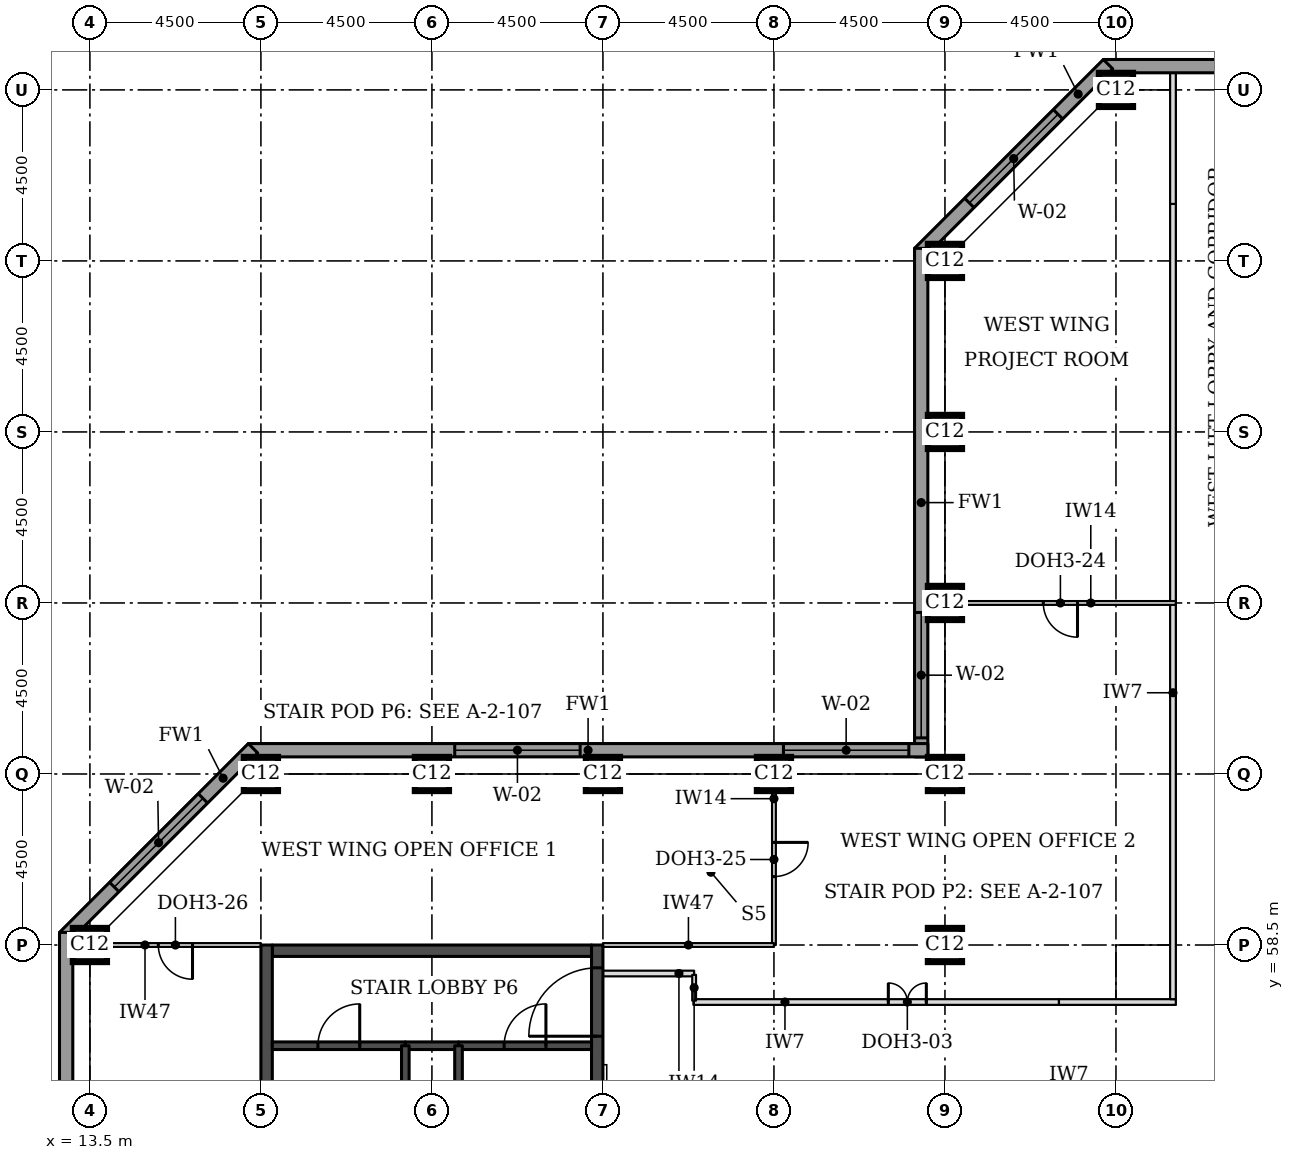
"""IFC4 building model, lengths in metres.
Left out: names, types, materials, properties, quantities, classifications, styles, units other than length and angle.
Written with IfcOpenShell. Run it as: python <this file> out.ifc"""

import sys

from ifc_helpers import new_model, si_unit, direction, frame, frame_2d, origin, origin_2d, place, context, subcontext, project, spatial, rectangle, extrude, element, fill, save


model = new_model("IFC4")
c1 = context("Model", 3, precision=1e-05, world=origin(), true_north=direction((0.0, 1.0)))
c2 = subcontext(c1, "Body", "Model", "MODEL_VIEW")
j1 = project(units=[si_unit("LENGTHUNIT", "METRE"), si_unit("PLANEANGLEUNIT", "RADIAN")], contexts=[c1])
p1 = place(None, origin())
s1 = spatial("IfcSite", under=j1, at=p1, CompositionType="ELEMENT")
p2 = place(p1, origin())
s2 = spatial("IfcBuilding", under=s1, at=p2, CompositionType="ELEMENT")
p3 = place(p2, frame((0.0, 0.0, 166.2)))
s3 = spatial("IfcBuildingStorey", under=s2, at=p3, CompositionType="ELEMENT", Elevation=166.2)
for number, where, z_axis, x_axis in (
    (1, (13.5, 58.5, 0.0), (0.0, 0.0, 1.0), (1.0, 0.0, 0.0)),
    (2, (36.0, 58.5, 0.0), (0.0, 0.0, 1.0), (1.0, 0.0, 0.0)),
    (3, (18.0, 63.0, 0.0), (0.0, 0.0, 1.0), (1.0, 0.0, 0.0)),
    (4, (22.5, 63.0, 0.0), (0.0, 0.0, 1.0), (1.0, 0.0, 0.0)),
    (5, (27.0, 63.0, 0.0), (0.0, 0.0, 1.0), (1.0, 0.0, 0.0)),
    (6, (31.5, 63.0, 0.0), (0.0, 0.0, 1.0), (1.0, 0.0, 0.0)),
    (7, (36.0, 63.0, 0.0), (0.0, 0.0, 1.0), (1.0, 0.0, 0.0)),
    (8, (36.0, 67.5, 0.0), (0.0, 0.0, 1.0), (1.0, 0.0, 0.0)),
    (9, (36.0, 72.0, 0.0), (0.0, 0.0, 1.0), (1.0, 0.0, 0.0)),
    (10, (36.0, 76.5, 0.0), (0.0, 0.0, 1.0), (1.0, 0.0, 0.0)),
    (11, (40.5, 81.0, 0.0), (0.0, 0.0, 1.0), (1.0, 0.0, 0.0)),
):
    element("IfcColumn", number, at=place(p3, frame(where, z_axis=z_axis, x_axis=x_axis)), inside=s3, PredefinedType="COLUMN", context=c2, shape_type="SweptSolid", body=[
        extrude(rectangle(XDim=0.9, YDim=0.9, at=origin_2d()), origin(), (0.0, 0.0, 1.0), 3.7),
    ])
p4 = place(p3, frame((18.3, 58.35, 0.0), z_axis=(0.0, 0.0, 1.0), x_axis=(1.0, 0.0, 0.0)))
e12 = element("IfcWall", 12, at=p4, inside=s3, PredefinedType="SHEAR", context=c2, shape_type="SweptSolid", body=[
    extrude(rectangle(XDim=8.4, YDim=0.3, at=frame_2d((4.2, 0.0))), origin(), (0.0, 0.0, 1.0), 3.7),
])
p5 = place(p3, frame((18.15, 49.5, 0.0), z_axis=(0.0, 0.0, 1.0), x_axis=(0.0, 1.0, 0.0)))
e13 = element("IfcWall", 13, at=p5, inside=s3, PredefinedType="SHEAR", context=c2, shape_type="SweptSolid", body=[
    extrude(rectangle(XDim=9.0, YDim=0.3, at=frame_2d((4.5, 0.0))), origin(), (0.0, 0.0, 1.0), 3.7),
])
p6 = place(p3, frame((26.85, 49.5, 0.0), z_axis=(0.0, 0.0, 1.0), x_axis=(0.0, 1.0, 0.0)))
e14 = element("IfcWall", 14, at=p6, inside=s3, PredefinedType="SHEAR", context=c2, shape_type="SweptSolid", body=[
    extrude(rectangle(XDim=9.0, YDim=0.3, at=frame_2d((4.5, 0.0))), origin(), (0.0, 0.0, 1.0), 3.7),
])
p7 = place(p6, frame((6.6, 0.0, 0.0)))
e15 = element("IfcOpeningElement", 15, at=p7, cuts=e14, PredefinedType="OPENING", context=c2, shape_type="SweptSolid", body=[
    extrude(rectangle(XDim=1.8, YDim=2.1, at=frame_2d((0.9, 1.05))), frame((0.0, 0.16, 0.0), z_axis=(0.0, -1.0, 0.0), x_axis=(1.0, 0.0, 0.0)), (0.0, 0.0, 1.0), 0.32),
])
p8 = place(p3, frame((72.331, 81.625, 0.0), z_axis=(0.0, 0.0, 1.0), x_axis=(-1.0, 0.0, 0.0)))
e16 = element("IfcWall", 16, at=p8, inside=s3, PredefinedType="STANDARD", context=c2, shape_type="SweptSolid", body=[
    extrude(rectangle(XDim=32.163, YDim=0.35, at=frame_2d((16.081, 0.0))), origin(), (0.0, 0.0, 1.0), 3.525),
])
p9 = place(p8, frame((5.431, 0.0, 0.9)))
e17 = element("IfcOpeningElement", 17, at=p9, cuts=e16, PredefinedType="OPENING", context=c2, shape_type="SweptSolid", body=[
    extrude(rectangle(XDim=3.3, YDim=1.9, at=frame_2d((1.65, 0.95))), frame((0.0, 0.185, 0.0), z_axis=(0.0, -1.0, 0.0), x_axis=(1.0, 0.0, 0.0)), (0.0, 0.0, 1.0), 0.37),
])
p10 = place(p8, frame((9.931, 0.0, 0.9)))
e18 = element("IfcOpeningElement", 18, at=p10, cuts=e16, PredefinedType="OPENING", context=c2, shape_type="SweptSolid", body=[
    extrude(rectangle(XDim=3.3, YDim=1.9, at=frame_2d((1.65, 0.95))), frame((0.0, 0.185, 0.0), z_axis=(0.0, -1.0, 0.0), x_axis=(1.0, 0.0, 0.0)), (0.0, 0.0, 1.0), 0.37),
])
p11 = place(p8, frame((14.431, 0.0, 0.9)))
e19 = element("IfcOpeningElement", 19, at=p11, cuts=e16, PredefinedType="OPENING", context=c2, shape_type="SweptSolid", body=[
    extrude(rectangle(XDim=3.3, YDim=1.9, at=frame_2d((1.65, 0.95))), frame((0.0, 0.185, 0.0), z_axis=(0.0, -1.0, 0.0), x_axis=(1.0, 0.0, 0.0)), (0.0, 0.0, 1.0), 0.37),
])
p12 = place(p8, frame((18.931, 0.0, 0.9)))
e20 = element("IfcOpeningElement", 20, at=p12, cuts=e16, PredefinedType="OPENING", context=c2, shape_type="SweptSolid", body=[
    extrude(rectangle(XDim=3.3, YDim=1.9, at=frame_2d((1.65, 0.95))), frame((0.0, 0.185, 0.0), z_axis=(0.0, -1.0, 0.0), x_axis=(1.0, 0.0, 0.0)), (0.0, 0.0, 1.0), 0.37),
])
p13 = place(p8, frame((23.431, 0.0, 0.9)))
e21 = element("IfcOpeningElement", 21, at=p13, cuts=e16, PredefinedType="OPENING", context=c2, shape_type="SweptSolid", body=[
    extrude(rectangle(XDim=3.3, YDim=1.9, at=frame_2d((1.65, 0.95))), frame((0.0, 0.185, 0.0), z_axis=(0.0, -1.0, 0.0), x_axis=(1.0, 0.0, 0.0)), (0.0, 0.0, 1.0), 0.37),
])
p14 = place(p3, frame((40.292, 81.676, 0.0), z_axis=(0.0, 0.0, 1.0), x_axis=(-0.707106781187, -0.707106781187, 0.0)))
e22 = element("IfcWall", 22, at=p14, inside=s3, PredefinedType="STANDARD", context=c2, shape_type="SweptSolid", body=[
    extrude(rectangle(XDim=7.027, YDim=0.35, at=frame_2d((3.513, 0.0))), origin(), (0.0, 0.0, 1.0), 3.525),
])
p15 = place(p14, frame((1.863, 0.0, 0.9)))
e23 = element("IfcOpeningElement", 23, at=p15, cuts=e22, PredefinedType="OPENING", context=c2, shape_type="SweptSolid", body=[
    extrude(rectangle(XDim=3.3, YDim=1.9, at=frame_2d((1.65, 0.95))), frame((0.0, 0.185, 0.0), z_axis=(0.0, -1.0, 0.0), x_axis=(1.0, 0.0, 0.0)), (0.0, 0.0, 1.0), 0.37),
])
p16 = place(p3, frame((35.375, 76.831, 0.0), z_axis=(0.0, 0.0, 1.0), x_axis=(0.0, -1.0, 0.0)))
e24 = element("IfcWall", 24, at=p16, inside=s3, PredefinedType="STANDARD", context=c2, shape_type="SweptSolid", body=[
    extrude(rectangle(XDim=13.381, YDim=0.35, at=frame_2d((6.691, 0.0))), origin(), (0.0, 0.0, 1.0), 3.525),
])
p17 = place(p16, frame((9.581, 0.0, 0.9)))
e25 = element("IfcOpeningElement", 25, at=p17, cuts=e24, PredefinedType="OPENING", context=c2, shape_type="SweptSolid", body=[
    extrude(rectangle(XDim=3.3, YDim=1.9, at=frame_2d((1.65, 0.95))), frame((0.0, 0.185, 0.0), z_axis=(0.0, -1.0, 0.0), x_axis=(1.0, 0.0, 0.0)), (0.0, 0.0, 1.0), 0.37),
])
p18 = place(p3, frame((35.55, 63.625, 0.0), z_axis=(0.0, 0.0, 1.0), x_axis=(-1.0, 0.0, 0.0)))
e26 = element("IfcWall", 26, at=p18, inside=s3, PredefinedType="STANDARD", context=c2, shape_type="SweptSolid", body=[
    extrude(rectangle(XDim=17.881, YDim=0.35, at=frame_2d((8.941, 0.0))), origin(), (0.0, 0.0, 1.0), 3.525),
])
p19 = place(p18, frame((0.5, 0.0, 0.9)))
e27 = element("IfcOpeningElement", 27, at=p19, cuts=e26, PredefinedType="OPENING", context=c2, shape_type="SweptSolid", body=[
    extrude(rectangle(XDim=3.3, YDim=1.9, at=frame_2d((1.65, 0.95))), frame((0.0, 0.185, 0.0), z_axis=(0.0, -1.0, 0.0), x_axis=(1.0, 0.0, 0.0)), (0.0, 0.0, 1.0), 0.37),
])
p20 = place(p18, frame((9.15, 0.0, 0.9)))
e28 = element("IfcOpeningElement", 28, at=p20, cuts=e26, PredefinedType="OPENING", context=c2, shape_type="SweptSolid", body=[
    extrude(rectangle(XDim=3.3, YDim=1.9, at=frame_2d((1.65, 0.95))), frame((0.0, 0.185, 0.0), z_axis=(0.0, -1.0, 0.0), x_axis=(1.0, 0.0, 0.0)), (0.0, 0.0, 1.0), 0.37),
])
p21 = place(p3, frame((17.792, 63.676, 0.0), z_axis=(0.0, 0.0, 1.0), x_axis=(-0.707106781187, -0.707106781187, 0.0)))
e29 = element("IfcWall", 29, at=p21, inside=s3, PredefinedType="STANDARD", context=c2, shape_type="SweptSolid", body=[
    extrude(rectangle(XDim=7.027, YDim=0.35, at=frame_2d((3.513, 0.0))), origin(), (0.0, 0.0, 1.0), 3.525),
])
p22 = place(p21, frame((1.863, 0.0, 0.9)))
e30 = element("IfcOpeningElement", 30, at=p22, cuts=e29, PredefinedType="OPENING", context=c2, shape_type="SweptSolid", body=[
    extrude(rectangle(XDim=3.3, YDim=1.9, at=frame_2d((1.65, 0.95))), frame((0.0, 0.185, 0.0), z_axis=(0.0, -1.0, 0.0), x_axis=(1.0, 0.0, 0.0)), (0.0, 0.0, 1.0), 0.37),
])
p23 = place(p3, frame((12.875, 58.831, 0.0), z_axis=(0.0, 0.0, 1.0), x_axis=(0.0, -1.0, 0.0)))
e31 = element("IfcWall", 31, at=p23, inside=s3, PredefinedType="STANDARD", context=c2, shape_type="SweptSolid", body=[
    extrude(rectangle(XDim=14.163, YDim=0.35, at=frame_2d((7.081, 0.0))), origin(), (0.0, 0.0, 1.0), 3.525),
])
p24 = place(p23, frame((5.431, 0.0, 0.9)))
e32 = element("IfcOpeningElement", 32, at=p24, cuts=e31, PredefinedType="OPENING", context=c2, shape_type="SweptSolid", body=[
    extrude(rectangle(XDim=3.3, YDim=1.9, at=frame_2d((1.65, 0.95))), frame((0.0, 0.185, 0.0), z_axis=(0.0, -1.0, 0.0), x_axis=(1.0, 0.0, 0.0)), (0.0, 0.0, 1.0), 0.37),
])
p25 = place(p3, frame((29.38, 57.0, 0.0), z_axis=(0.0, 0.0, 1.0), x_axis=(1.0, 0.0, 0.0)))
e33 = element("IfcWall", 33, at=p25, inside=s3, PredefinedType="PARTITIONING", context=c2, shape_type="SweptSolid", body=[
    extrude(rectangle(XDim=9.62, YDim=0.15, at=frame_2d((4.81, 0.0))), origin(), (0.0, 0.0, 1.0), 3.55),
])
p26 = place(p25, frame((5.13, 0.0, 0.0)))
e34 = element("IfcOpeningElement", 34, at=p26, cuts=e33, PredefinedType="OPENING", context=c2, shape_type="SweptSolid", body=[
    extrude(rectangle(XDim=1.0, YDim=2.1, at=frame_2d((0.5, 1.05))), frame((0.0, 0.085, 0.0), z_axis=(0.0, -1.0, 0.0), x_axis=(1.0, 0.0, 0.0)), (0.0, 0.0, 1.0), 0.17),
])
p27 = place(p3, frame((39.0, 57.0, 0.0), z_axis=(0.0, 0.0, 1.0), x_axis=(1.0, 0.0, 0.0)))
e35 = element("IfcWall", 35, at=p27, inside=s3, PredefinedType="PARTITIONING", context=c2, shape_type="SweptSolid", body=[
    extrude(rectangle(XDim=3.075, YDim=0.15, at=frame_2d((1.538, 0.0))), origin(), (0.0, 0.0, 1.0), 3.55),
])
p28 = place(p3, frame((42.0, 57.075, 0.0), z_axis=(0.0, 0.0, 1.0), x_axis=(0.0, 1.0, 0.0)))
e36 = element("IfcWall", 36, at=p28, inside=s3, PredefinedType="PARTITIONING", context=c2, shape_type="SweptSolid", body=[
    extrude(rectangle(XDim=20.925, YDim=0.15, at=frame_2d((10.462, 0.0))), origin(), (0.0, 0.0, 1.0), 3.55),
])
p29 = place(p3, frame((42.0, 78.0, 0.0), z_axis=(0.0, 0.0, 1.0), x_axis=(0.0, 1.0, 0.0)))
e37 = element("IfcWall", 37, at=p29, inside=s3, PredefinedType="PARTITIONING", context=c2, shape_type="SweptSolid", body=[
    extrude(rectangle(XDim=3.45, YDim=0.15, at=frame_2d((1.725, 0.0))), origin(), (0.0, 0.0, 1.0), 3.55),
])
p30 = place(p3, frame((36.0, 67.5, 0.0), z_axis=(0.0, 0.0, 1.0), x_axis=(1.0, 0.0, 0.0)))
e38 = element("IfcWall", 38, at=p30, inside=s3, PredefinedType="PARTITIONING", context=c2, shape_type="SweptSolid", body=[
    extrude(rectangle(XDim=6.075, YDim=0.1, at=frame_2d((3.038, 0.0))), origin(), (0.0, 0.0, 1.0), 3.55),
])
p31 = place(p30, frame((2.588, 0.0, 0.0)))
e39 = element("IfcOpeningElement", 39, at=p31, cuts=e38, PredefinedType="OPENING", context=c2, shape_type="SweptSolid", body=[
    extrude(rectangle(XDim=0.9, YDim=2.1, at=frame_2d((0.45, 1.05))), frame((0.0, 0.06, 0.0), z_axis=(0.0, -1.0, 0.0), x_axis=(1.0, 0.0, 0.0)), (0.0, 0.0, 1.0), 0.12),
])
p32 = place(p3, frame((31.5, 63.0, 0.0), z_axis=(0.0, 0.0, 1.0), x_axis=(0.0, -1.0, 0.0)))
e40 = element("IfcWall", 40, at=p32, inside=s3, PredefinedType="PARTITIONING", context=c2, shape_type="SweptSolid", body=[
    extrude(rectangle(XDim=4.5, YDim=0.1, at=frame_2d((2.25, 0.0))), origin(), (0.0, 0.0, 1.0), 3.55),
])
p33 = place(p32, frame((1.8, 0.0, 0.0)))
e41 = element("IfcOpeningElement", 41, at=p33, cuts=e40, PredefinedType="OPENING", context=c2, shape_type="SweptSolid", body=[
    extrude(rectangle(XDim=0.9, YDim=2.1, at=frame_2d((0.45, 1.05))), frame((0.0, 0.06, 0.0), z_axis=(0.0, -1.0, 0.0), x_axis=(1.0, 0.0, 0.0)), (0.0, 0.0, 1.0), 0.12),
])
p34 = place(p3, frame((31.5, 58.5, 0.0), z_axis=(0.0, 0.0, 1.0), x_axis=(-1.0, 0.0, 0.0)))
e42 = element("IfcWall", 42, at=p34, inside=s3, PredefinedType="PARTITIONING", context=c2, shape_type="SweptSolid", body=[
    extrude(rectangle(XDim=4.5, YDim=0.1, at=frame_2d((2.25, 0.0))), origin(), (0.0, 0.0, 1.0), 2.55),
])
p35 = place(p3, frame((13.5, 58.5, 0.0), z_axis=(0.0, 0.0, 1.0), x_axis=(1.0, 0.0, 0.0)))
e43 = element("IfcWall", 43, at=p35, inside=s3, PredefinedType="PARTITIONING", context=c2, shape_type="SweptSolid", body=[
    extrude(rectangle(XDim=4.5, YDim=0.1, at=frame_2d((2.25, 0.0))), origin(), (0.0, 0.0, 1.0), 2.55),
])
p36 = place(p35, frame((1.8, 0.0, 0.0)))
e44 = element("IfcOpeningElement", 44, at=p36, cuts=e43, PredefinedType="OPENING", context=c2, shape_type="SweptSolid", body=[
    extrude(rectangle(XDim=0.9, YDim=2.1, at=frame_2d((0.45, 1.05))), frame((0.0, 0.06, 0.0), z_axis=(0.0, -1.0, 0.0), x_axis=(1.0, 0.0, 0.0)), (0.0, 0.0, 1.0), 0.12),
])
p37 = place(p3, frame((27.0, 57.75, 0.0), z_axis=(0.0, 0.0, 1.0), x_axis=(1.0, 0.0, 0.0)))
e45 = element("IfcWall", 45, at=p37, inside=s3, PredefinedType="PARTITIONING", context=c2, shape_type="SweptSolid", body=[
    extrude(rectangle(XDim=2.4, YDim=0.15, at=frame_2d((1.2, 0.0))), origin(), (0.0, 0.0, 1.0), 3.55),
])
p38 = place(p3, frame((29.4, 57.715, 0.0), z_axis=(0.0, 0.0, 1.0), x_axis=(0.0, -1.0, 0.0)))
e46 = element("IfcWall", 46, at=p38, inside=s3, PredefinedType="PARTITIONING", context=c2, shape_type="SweptSolid", body=[
    extrude(rectangle(XDim=0.68, YDim=0.1, at=frame_2d((0.34, 0.0))), origin(), (0.0, 0.0, 1.0), 3.55),
])
p39 = place(p3, frame((21.8, 55.85, 0.0), z_axis=(0.0, 0.0, 1.0), x_axis=(1.0, 0.0, 0.0)))
e47 = element("IfcWall", 47, at=p39, inside=s3, PredefinedType="SOLIDWALL", context=c2, shape_type="SweptSolid", body=[
    extrude(rectangle(XDim=1.4, YDim=0.2, at=frame_2d((0.7, 0.0))), origin(), (0.0, 0.0, 1.0), 3.55),
])
p40 = place(p3, frame((18.3, 55.85, 0.0), z_axis=(0.0, 0.0, 1.0), x_axis=(1.0, 0.0, 0.0)))
e48 = element("IfcWall", 48, at=p40, inside=s3, PredefinedType="SOLIDWALL", context=c2, shape_type="SweptSolid", body=[
    extrude(rectangle(XDim=3.5, YDim=0.2, at=frame_2d((1.75, 0.0))), origin(), (0.0, 0.0, 1.0), 3.55),
])
p41 = place(p40, frame((1.2, 0.0, 0.0)))
e49 = element("IfcOpeningElement", 49, at=p41, cuts=e48, PredefinedType="OPENING", context=c2, shape_type="SweptSolid", body=[
    extrude(rectangle(XDim=1.1, YDim=2.1, at=frame_2d((0.55, 1.05))), frame((0.0, 0.11, 0.0), z_axis=(0.0, -1.0, 0.0), x_axis=(1.0, 0.0, 0.0)), (0.0, 0.0, 1.0), 0.22),
])
p42 = place(p3, frame((23.2, 55.85, 0.0), z_axis=(0.0, 0.0, 1.0), x_axis=(1.0, 0.0, 0.0)))
e50 = element("IfcWall", 50, at=p42, inside=s3, PredefinedType="SOLIDWALL", context=c2, shape_type="SweptSolid", body=[
    extrude(rectangle(XDim=3.5, YDim=0.2, at=frame_2d((1.75, 0.0))), origin(), (0.0, 0.0, 1.0), 3.55),
])
p43 = place(p42, frame((1.2, 0.0, 0.0)))
e51 = element("IfcOpeningElement", 51, at=p43, cuts=e50, PredefinedType="OPENING", context=c2, shape_type="SweptSolid", body=[
    extrude(rectangle(XDim=1.1, YDim=2.1, at=frame_2d((0.55, 1.05))), frame((0.0, 0.11, 0.0), z_axis=(0.0, -1.0, 0.0), x_axis=(1.0, 0.0, 0.0)), (0.0, 0.0, 1.0), 0.22),
])
for number, where, z_axis, x_axis in (
    (52, (21.8, 49.8, 0.0), (0.0, 0.0, 1.0), (0.0, 1.0, 0.0)),
    (53, (23.2, 49.8, 0.0), (0.0, 0.0, 1.0), (0.0, 1.0, 0.0)),
):
    element("IfcWall", number, at=place(p3, frame(where, z_axis=z_axis, x_axis=x_axis)), inside=s3, PredefinedType="SOLIDWALL", context=c2, shape_type="SweptSolid", body=[
        extrude(rectangle(XDim=6.05, YDim=0.2, at=frame_2d((3.025, 0.0))), origin(), (0.0, 0.0, 1.0), 3.55),
    ])
p44 = place(p15, origin())
e54 = element("IfcWindow", 54, at=p44, inside=s3, PartitioningType="SINGLE_PANEL", PredefinedType="WINDOW", context=c2, shape_type="SweptSolid", body=[
    extrude(rectangle(XDim=3.3, YDim=1.9, at=frame_2d((1.65, 0.95))), frame((0.0, 0.085, 0.0), z_axis=(0.0, -1.0, 0.0), x_axis=(1.0, 0.0, 0.0)), (0.0, 0.0, 1.0), 0.06),
])
fill(e23, e54)
p45 = place(p17, origin())
e55 = element("IfcWindow", 55, at=p45, inside=s3, PartitioningType="SINGLE_PANEL", PredefinedType="WINDOW", context=c2, shape_type="SweptSolid", body=[
    extrude(rectangle(XDim=3.3, YDim=1.9, at=frame_2d((1.65, 0.95))), frame((0.0, 0.085, 0.0), z_axis=(0.0, -1.0, 0.0), x_axis=(1.0, 0.0, 0.0)), (0.0, 0.0, 1.0), 0.06),
])
fill(e25, e55)
p46 = place(p19, origin())
e56 = element("IfcWindow", 56, at=p46, inside=s3, PartitioningType="SINGLE_PANEL", PredefinedType="WINDOW", context=c2, shape_type="SweptSolid", body=[
    extrude(rectangle(XDim=3.3, YDim=1.9, at=frame_2d((1.65, 0.95))), frame((0.0, 0.085, 0.0), z_axis=(0.0, -1.0, 0.0), x_axis=(1.0, 0.0, 0.0)), (0.0, 0.0, 1.0), 0.06),
])
fill(e27, e56)
p47 = place(p20, origin())
e57 = element("IfcWindow", 57, at=p47, inside=s3, PartitioningType="SINGLE_PANEL", PredefinedType="WINDOW", context=c2, shape_type="SweptSolid", body=[
    extrude(rectangle(XDim=3.3, YDim=1.9, at=frame_2d((1.65, 0.95))), frame((0.0, 0.085, 0.0), z_axis=(0.0, -1.0, 0.0), x_axis=(1.0, 0.0, 0.0)), (0.0, 0.0, 1.0), 0.06),
])
fill(e28, e57)
p48 = place(p22, origin())
e58 = element("IfcWindow", 58, at=p48, inside=s3, PartitioningType="SINGLE_PANEL", PredefinedType="WINDOW", context=c2, shape_type="SweptSolid", body=[
    extrude(rectangle(XDim=3.3, YDim=1.9, at=frame_2d((1.65, 0.95))), frame((0.0, 0.085, 0.0), z_axis=(0.0, -1.0, 0.0), x_axis=(1.0, 0.0, 0.0)), (0.0, 0.0, 1.0), 0.06),
])
fill(e30, e58)
p49 = place(p26, origin())
e59 = element("IfcDoor", 59, at=p49, inside=s3, OperationType="DOUBLE_DOOR_SINGLE_SWING", PredefinedType="DOOR", context=c2, shape_type="SweptSolid", body=[
    extrude(rectangle(XDim=1.0, YDim=2.1, at=frame_2d((0.5, 1.05))), frame((0.0, 0.025, 0.0), z_axis=(0.0, -1.0, 0.0), x_axis=(1.0, 0.0, 0.0)), (0.0, 0.0, 1.0), 0.05),
])
fill(e34, e59)
p50 = place(p33, origin())
e60 = element("IfcDoor", 60, at=p50, inside=s3, OperationType="SINGLE_SWING_LEFT", PredefinedType="DOOR", context=c2, shape_type="SweptSolid", body=[
    extrude(rectangle(XDim=0.9, YDim=2.1, at=frame_2d((0.45, 1.05))), frame((0.0, 0.025, 0.0), z_axis=(0.0, -1.0, 0.0), x_axis=(1.0, 0.0, 0.0)), (0.0, 0.0, 1.0), 0.05),
])
fill(e41, e60)
p51 = place(p31, frame((0.9, 0.0, 0.0), z_axis=(0.0, 0.0, 1.0), x_axis=(-1.0, 0.0, 0.0)))
e61 = element("IfcDoor", 61, at=p51, inside=s3, OperationType="SINGLE_SWING_LEFT", PredefinedType="DOOR", context=c2, shape_type="SweptSolid", body=[
    extrude(rectangle(XDim=0.9, YDim=2.1, at=frame_2d((0.45, 1.05))), frame((0.0, 0.025, 0.0), z_axis=(0.0, -1.0, 0.0), x_axis=(1.0, 0.0, 0.0)), (0.0, 0.0, 1.0), 0.05),
])
fill(e39, e61)
p52 = place(p36, frame((0.9, 0.0, 0.0), z_axis=(0.0, 0.0, 1.0), x_axis=(-1.0, 0.0, 0.0)))
e62 = element("IfcDoor", 62, at=p52, inside=s3, OperationType="SINGLE_SWING_LEFT", PredefinedType="DOOR", context=c2, shape_type="SweptSolid", body=[
    extrude(rectangle(XDim=0.9, YDim=2.1, at=frame_2d((0.45, 1.05))), frame((0.0, 0.025, 0.0), z_axis=(0.0, -1.0, 0.0), x_axis=(1.0, 0.0, 0.0)), (0.0, 0.0, 1.0), 0.05),
])
fill(e44, e62)
p53 = place(p41, origin())
e63 = element("IfcDoor", 63, at=p53, inside=s3, OperationType="SINGLE_SWING_RIGHT", PredefinedType="DOOR", context=c2, shape_type="SweptSolid", body=[
    extrude(rectangle(XDim=1.1, YDim=2.1, at=frame_2d((0.55, 1.05))), frame((0.0, 0.025, 0.0), z_axis=(0.0, -1.0, 0.0), x_axis=(1.0, 0.0, 0.0)), (0.0, 0.0, 1.0), 0.05),
])
fill(e49, e63)
p54 = place(p43, origin())
e64 = element("IfcDoor", 64, at=p54, inside=s3, OperationType="SINGLE_SWING_RIGHT", PredefinedType="DOOR", context=c2, shape_type="SweptSolid", body=[
    extrude(rectangle(XDim=1.1, YDim=2.1, at=frame_2d((0.55, 1.05))), frame((0.0, 0.025, 0.0), z_axis=(0.0, -1.0, 0.0), x_axis=(1.0, 0.0, 0.0)), (0.0, 0.0, 1.0), 0.05),
])
fill(e51, e64)
p55 = place(p7, origin())
e65 = element("IfcDoor", 65, at=p55, inside=s3, OperationType="SINGLE_SWING_LEFT", PredefinedType="DOOR", context=c2, shape_type="SweptSolid", body=[
    extrude(rectangle(XDim=1.8, YDim=2.1, at=frame_2d((0.9, 1.05))), frame((0.0, 0.025, 0.0), z_axis=(0.0, -1.0, 0.0), x_axis=(1.0, 0.0, 0.0)), (0.0, 0.0, 1.0), 0.05),
])
fill(e15, e65)
save(model, sys.argv[1])
